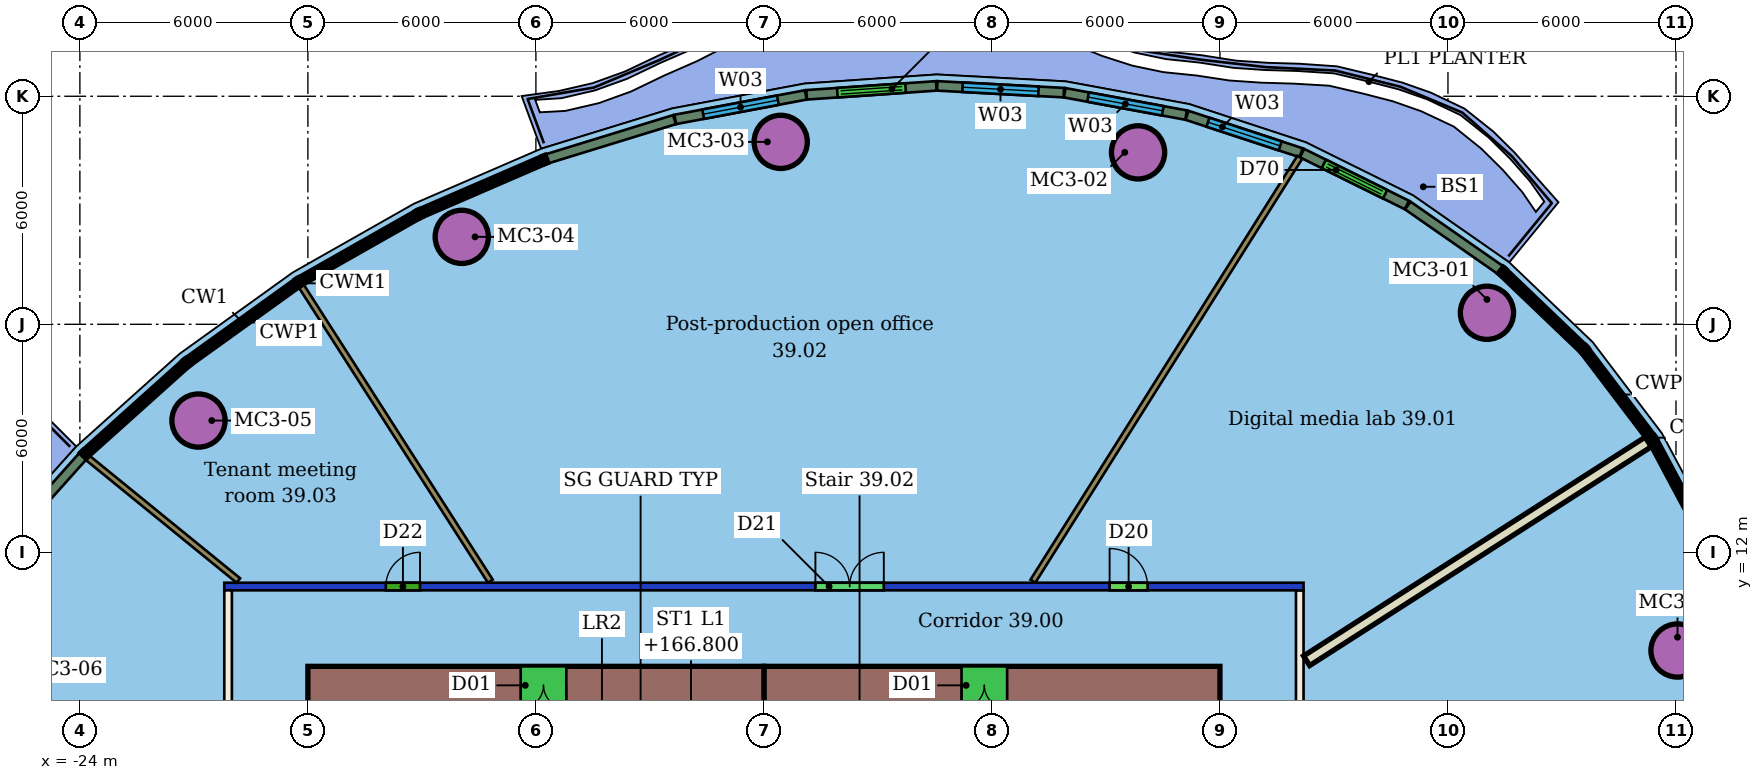
"""IFC4 building model, lengths in metres.
Left out: names, types, materials, properties, quantities, classifications, styles, units other than length and angle.
Written with IfcOpenShell. Run it as: python <this file> out.ifc"""

import sys

from ifc_helpers import new_model, si_unit, direction, frame, frame_2d, origin, origin_2d, place, context, subcontext, project, spatial, rectangle, hollow_circle, extrude, element, fill, save


model = new_model("IFC4")
c1 = context("Model", 3, precision=1e-05, world=origin(), true_north=direction((0.0, 1.0)))
c2 = subcontext(c1, "Body", "Model", "MODEL_VIEW")
j1 = project(units=[si_unit("LENGTHUNIT", "METRE"), si_unit("PLANEANGLEUNIT", "RADIAN")], contexts=[c1])
p1 = place(None, origin())
s1 = spatial("IfcSite", under=j1, at=p1, CompositionType="ELEMENT")
p2 = place(p1, origin())
s2 = spatial("IfcBuilding", under=s1, at=p2, CompositionType="ELEMENT")
p3 = place(p2, frame((0.0, 0.0, 165.0)))
s3 = spatial("IfcBuildingStorey", under=s2, at=p3, CompositionType="ELEMENT", Elevation=165.0)
for number, where, z_axis, x_axis in (
    (1, (13.026, 18.303, 0.0), (0.0, 0.0, 1.0), (1.0, 0.0, 0.0)),
    (2, (3.845, 22.524, 0.0), (0.0, 0.0, 1.0), (1.0, 0.0, 0.0)),
    (3, (-5.558, 22.8, 0.0), (0.0, 0.0, 1.0), (1.0, 0.0, 0.0)),
    (4, (-13.952, 20.301, 0.0), (0.0, 0.0, 1.0), (1.0, 0.0, 0.0)),
    (5, (-20.879, 15.467, 0.0), (0.0, 0.0, 1.0), (1.0, 0.0, 0.0)),
    (6, (18.041, 9.417, 0.0), (0.0, 0.0, 1.0), (1.0, 0.0, 0.0)),
):
    element("IfcColumn", number, at=place(p3, frame(where, z_axis=z_axis, x_axis=x_axis)), inside=s3, PredefinedType="COLUMN", context=c2, shape_type="SweptSolid", body=[
        extrude(hollow_circle(Radius=0.7, WallThickness=0.05, at=origin_2d()), origin(), (0.0, 0.0, 1.0), 3.45),
    ])
p4 = place(p3, frame((-20.1, -11.0, 0.0), z_axis=(0.0, 0.0, 1.0), x_axis=(0.0, 1.0, 0.0)))
e7 = element("IfcWall", 7, at=p4, inside=s3, PredefinedType="PARTITIONING", context=c2, shape_type="SweptSolid", body=[
    extrude(rectangle(XDim=22.0, YDim=0.2, at=frame_2d((11.0, 0.0))), origin(), (0.0, 0.0, 1.0), 3.45),
])
p5 = place(p4, frame((16.748, 0.0, 0.0)))
e8 = element("IfcOpeningElement", 8, at=p5, cuts=e7, PredefinedType="OPENING", context=c2, shape_type="SweptSolid", body=[
    extrude(rectangle(XDim=1.0, YDim=2.1, at=frame_2d((0.5, 1.05))), frame((0.0, 0.11, 0.0), z_axis=(0.0, -1.0, 0.0), x_axis=(1.0, 0.0, 0.0)), (0.0, 0.0, 1.0), 0.22),
])
p6 = place(p4, frame((11.959, 0.0, 0.0)))
e9 = element("IfcOpeningElement", 9, at=p6, cuts=e7, PredefinedType="OPENING", context=c2, shape_type="SweptSolid", body=[
    extrude(rectangle(XDim=1.1, YDim=2.1, at=frame_2d((0.55, 1.05))), frame((0.0, 0.11, 0.0), z_axis=(0.0, -1.0, 0.0), x_axis=(1.0, 0.0, 0.0)), (0.0, 0.0, 1.0), 0.22),
])
p7 = place(p4, frame((5.319, 0.0, 0.0)))
e10 = element("IfcOpeningElement", 10, at=p7, cuts=e7, PredefinedType="OPENING", context=c2, shape_type="SweptSolid", body=[
    extrude(rectangle(XDim=1.2, YDim=2.1, at=frame_2d((0.6, 1.05))), frame((0.0, 0.11, 0.0), z_axis=(0.0, -1.0, 0.0), x_axis=(1.0, 0.0, 0.0)), (0.0, 0.0, 1.0), 0.22),
])
p8 = place(p3, frame((-20.2, 11.1, 0.0), z_axis=(0.0, 0.0, 1.0), x_axis=(1.0, 0.0, 0.0)))
e11 = element("IfcWall", 11, at=p8, inside=s3, PredefinedType="PARTITIONING", context=c2, shape_type="SweptSolid", body=[
    extrude(rectangle(XDim=28.4, YDim=0.2, at=frame_2d((14.2, 0.0))), origin(), (0.0, 0.0, 1.0), 3.05),
])
p9 = place(p8, frame((23.297, 0.0, 0.0)))
e12 = element("IfcOpeningElement", 12, at=p9, cuts=e11, PredefinedType="OPENING", context=c2, shape_type="SweptSolid", body=[
    extrude(rectangle(XDim=1.0, YDim=2.1, at=frame_2d((0.5, 1.05))), frame((0.0, 0.11, 0.0), z_axis=(0.0, -1.0, 0.0), x_axis=(1.0, 0.0, 0.0)), (0.0, 0.0, 1.0), 0.22),
])
p10 = place(p8, frame((15.555, 0.0, 0.0)))
e13 = element("IfcOpeningElement", 13, at=p10, cuts=e11, PredefinedType="OPENING", context=c2, shape_type="SweptSolid", body=[
    extrude(rectangle(XDim=1.8, YDim=2.1, at=frame_2d((0.9, 1.05))), frame((0.0, 0.11, 0.0), z_axis=(0.0, -1.0, 0.0), x_axis=(1.0, 0.0, 0.0)), (0.0, 0.0, 1.0), 0.22),
])
p11 = place(p8, frame((4.251, 0.0, 0.0)))
e14 = element("IfcOpeningElement", 14, at=p11, cuts=e11, PredefinedType="OPENING", context=c2, shape_type="SweptSolid", body=[
    extrude(rectangle(XDim=0.9, YDim=2.1, at=frame_2d((0.45, 1.05))), frame((0.0, 0.11, 0.0), z_axis=(0.0, -1.0, 0.0), x_axis=(1.0, 0.0, 0.0)), (0.0, 0.0, 1.0), 0.22),
])
p12 = place(p3, frame((8.1, 11.0, 0.0), z_axis=(0.0, 0.0, 1.0), x_axis=(0.0, -1.0, 0.0)))
e15 = element("IfcWall", 15, at=p12, inside=s3, PredefinedType="PARTITIONING", context=c2, shape_type="SweptSolid", body=[
    extrude(rectangle(XDim=22.0, YDim=0.2, at=frame_2d((11.0, 0.0))), origin(), (0.0, 0.0, 1.0), 3.45),
])
p13 = place(p12, frame((12.895, 0.0, 0.0)))
e16 = element("IfcOpeningElement", 16, at=p13, cuts=e15, PredefinedType="OPENING", context=c2, shape_type="SweptSolid", body=[
    extrude(rectangle(XDim=1.2, YDim=2.1, at=frame_2d((0.6, 1.05))), frame((0.0, 0.11, 0.0), z_axis=(0.0, -1.0, 0.0), x_axis=(1.0, 0.0, 0.0)), (0.0, 0.0, 1.0), 0.22),
])
p14 = place(p12, frame((5.997, 0.0, 0.0)))
e17 = element("IfcOpeningElement", 17, at=p14, cuts=e15, PredefinedType="OPENING", context=c2, shape_type="SweptSolid", body=[
    extrude(rectangle(XDim=1.1, YDim=2.1, at=frame_2d((0.55, 1.05))), frame((0.0, 0.11, 0.0), z_axis=(0.0, -1.0, 0.0), x_axis=(1.0, 0.0, 0.0)), (0.0, 0.0, 1.0), 0.22),
])
p15 = place(p3, frame((17.27, 14.905, 0.0), z_axis=(0.0, 0.0, 1.0), x_axis=(-0.842071977219, -0.539365168678, 0.0)))
e18 = element("IfcWall", 18, at=p15, inside=s3, PredefinedType="PARTITIONING", context=c2, shape_type="SweptSolid", body=[
    extrude(rectangle(XDim=10.675, YDim=0.3, at=frame_2d((5.337, 0.0))), origin(), (0.0, 0.0, 1.0), 3.45),
])
p16 = place(p3, frame((8.101, 22.394, 0.0), z_axis=(0.0, 0.0, 1.0), x_axis=(-0.532862885492, -0.846201598477, 0.0)))
e19 = element("IfcWall", 19, at=p16, inside=s3, PredefinedType="PARTITIONING", context=c2, shape_type="SweptSolid", body=[
    extrude(rectangle(XDim=13.181, YDim=0.15, at=frame_2d((6.59, 0.0))), origin(), (0.0, 0.0, 1.0), 3.45),
])
p17 = place(p3, frame((-18.172, 19.004, 0.0), z_axis=(0.0, 0.0, 1.0), x_axis=(0.539366262067, -0.842071276879, 0.0)))
e20 = element("IfcWall", 20, at=p17, inside=s3, PredefinedType="PARTITIONING", context=c2, shape_type="SweptSolid", body=[
    extrude(rectangle(XDim=9.219, YDim=0.15, at=frame_2d((4.61, 0.0))), origin(), (0.0, 0.0, 1.0), 3.45),
])
p18 = place(p3, frame((-23.794, 14.485, 0.0), z_axis=(0.0, 0.0, 1.0), x_axis=(0.775504350121, -0.631342223317, 0.0)))
e21 = element("IfcWall", 21, at=p18, inside=s3, PredefinedType="PARTITIONING", context=c2, shape_type="SweptSolid", body=[
    extrude(rectangle(XDim=5.111, YDim=0.15, at=frame_2d((2.556, 0.0))), origin(), (0.0, 0.0, 1.0), 3.45),
])
p19 = place(p3, frame((13.378, 19.429, 0.0), z_axis=(0.0, 0.0, 1.0), x_axis=(-0.820566469183, 0.571551108521, 0.0)))
e22 = element("IfcWall", 22, at=p19, inside=s3, PredefinedType="SOLIDWALL", context=c2, shape_type="SweptSolid", body=[
    extrude(rectangle(XDim=2.969, YDim=0.25, at=frame_2d((1.484, 0.0))), origin(), (0.0, 0.0, 1.0), 3.1),
])
p20 = place(p3, frame((10.919, 21.139, 0.0), z_axis=(0.0, 0.0, 1.0), x_axis=(-0.896353964816, 0.443339113725, 0.0)))
e23 = element("IfcWall", 23, at=p20, inside=s3, PredefinedType="SOLIDWALL", context=c2, shape_type="SweptSolid", body=[
    extrude(rectangle(XDim=3.078, YDim=0.25, at=frame_2d((1.539, 0.0))), origin(), (0.0, 0.0, 1.0), 3.1),
])
p21 = place(p20, frame((0.639, 0.0, 0.0)))
e24 = element("IfcOpeningElement", 24, at=p21, cuts=e23, PredefinedType="OPENING", context=c2, shape_type="SweptSolid", body=[
    extrude(rectangle(XDim=1.8, YDim=2.4, at=frame_2d((0.9, 1.2))), frame((0.0, 0.135, 0.0), z_axis=(0.0, -1.0, 0.0), x_axis=(1.0, 0.0, 0.0)), (0.0, 0.0, 1.0), 0.27),
])
p22 = place(p3, frame((8.136, 22.514, 0.0), z_axis=(0.0, 0.0, 1.0), x_axis=(-0.950163900918, 0.311750800147, 0.0)))
e25 = element("IfcWall", 25, at=p22, inside=s3, PredefinedType="SOLIDWALL", context=c2, shape_type="SweptSolid", body=[
    extrude(rectangle(XDim=3.16, YDim=0.25, at=frame_2d((1.58, 0.0))), origin(), (0.0, 0.0, 1.0), 3.1),
])
p23 = place(p22, frame((0.58, 0.0, 0.9)))
e26 = element("IfcOpeningElement", 26, at=p23, cuts=e25, PredefinedType="OPENING", context=c2, shape_type="SweptSolid", body=[
    extrude(rectangle(XDim=2.0, YDim=2.1, at=frame_2d((1.0, 1.05))), frame((0.0, 0.135, 0.0), z_axis=(0.0, -1.0, 0.0), x_axis=(1.0, 0.0, 0.0)), (0.0, 0.0, 1.0), 0.27),
])
p24 = place(p3, frame((5.11, 23.505, 0.0), z_axis=(0.0, 0.0, 1.0), x_axis=(-0.983511988616, 0.180842938067, 0.0)))
e27 = element("IfcWall", 27, at=p24, inside=s3, PredefinedType="SOLIDWALL", context=c2, shape_type="SweptSolid", body=[
    extrude(rectangle(XDim=3.248, YDim=0.25, at=frame_2d((1.624, 0.0))), origin(), (0.0, 0.0, 1.0), 3.1),
])
p25 = place(p24, frame((0.624, 0.0, 0.9)))
e28 = element("IfcOpeningElement", 28, at=p25, cuts=e27, PredefinedType="OPENING", context=c2, shape_type="SweptSolid", body=[
    extrude(rectangle(XDim=2.0, YDim=2.1, at=frame_2d((1.0, 1.05))), frame((0.0, 0.135, 0.0), z_axis=(0.0, -1.0, 0.0), x_axis=(1.0, 0.0, 0.0)), (0.0, 0.0, 1.0), 0.27),
])
p26 = place(p3, frame((1.891, 24.095, 0.0), z_axis=(0.0, 0.0, 1.0), x_axis=(-0.998572595535, 0.053411341936, 0.0)))
e29 = element("IfcWall", 29, at=p26, inside=s3, PredefinedType="SOLIDWALL", context=c2, shape_type="SweptSolid", body=[
    extrude(rectangle(XDim=3.337, YDim=0.25, at=frame_2d((1.668, 0.0))), origin(), (0.0, 0.0, 1.0), 3.1),
])
p27 = place(p26, frame((0.668, 0.0, 0.9)))
e30 = element("IfcOpeningElement", 30, at=p27, cuts=e29, PredefinedType="OPENING", context=c2, shape_type="SweptSolid", body=[
    extrude(rectangle(XDim=2.0, YDim=2.1, at=frame_2d((1.0, 1.05))), frame((0.0, 0.135, 0.0), z_axis=(0.0, -1.0, 0.0), x_axis=(1.0, 0.0, 0.0)), (0.0, 0.0, 1.0), 0.27),
])
p28 = place(p3, frame((-1.464, 24.273, 0.0), z_axis=(0.0, 0.0, 1.0), x_axis=(-0.997639779644, -0.068664911499, 0.0)))
e31 = element("IfcWall", 31, at=p28, inside=s3, PredefinedType="SOLIDWALL", context=c2, shape_type="SweptSolid", body=[
    extrude(rectangle(XDim=3.42, YDim=0.25, at=frame_2d((1.71, 0.0))), origin(), (0.0, 0.0, 1.0), 3.1),
])
p29 = place(p28, frame((0.81, 0.0, 0.0)))
e32 = element("IfcOpeningElement", 32, at=p29, cuts=e31, PredefinedType="OPENING", context=c2, shape_type="SweptSolid", body=[
    extrude(rectangle(XDim=1.8, YDim=2.4, at=frame_2d((0.9, 1.2))), frame((0.0, 0.135, 0.0), z_axis=(0.0, -1.0, 0.0), x_axis=(1.0, 0.0, 0.0)), (0.0, 0.0, 1.0), 0.27),
])
p30 = place(p3, frame((-4.899, 24.035, 0.0), z_axis=(0.0, 0.0, 1.0), x_axis=(-0.982808840364, -0.184626063442, 0.0)))
e33 = element("IfcWall", 33, at=p30, inside=s3, PredefinedType="SOLIDWALL", context=c2, shape_type="SweptSolid", body=[
    extrude(rectangle(XDim=3.494, YDim=0.25, at=frame_2d((1.747, 0.0))), origin(), (0.0, 0.0, 1.0), 3.1),
])
p31 = place(p30, frame((0.747, 0.0, 0.9)))
e34 = element("IfcOpeningElement", 34, at=p31, cuts=e33, PredefinedType="OPENING", context=c2, shape_type="SweptSolid", body=[
    extrude(rectangle(XDim=2.0, YDim=2.1, at=frame_2d((1.0, 1.05))), frame((0.0, 0.135, 0.0), z_axis=(0.0, -1.0, 0.0), x_axis=(1.0, 0.0, 0.0)), (0.0, 0.0, 1.0), 0.27),
])
p32 = place(p3, frame((-8.354, 23.385, 0.0), z_axis=(0.0, 0.0, 1.0), x_axis=(-0.955795559149, -0.294032054565, 0.0)))
e35 = element("IfcWall", 35, at=p32, inside=s3, PredefinedType="SOLIDWALL", context=c2, shape_type="SweptSolid", body=[
    extrude(rectangle(XDim=3.508, YDim=0.25, at=frame_2d((1.754, 0.0))), origin(), (0.0, 0.0, 1.0), 3.1),
])
p33 = place(p3, frame((-23.919, 14.532, 0.0), z_axis=(0.0, 0.0, 1.0), x_axis=(-0.666731798782, -0.745297731443, 0.0)))
e36 = element("IfcWall", 36, at=p33, inside=s3, PredefinedType="SOLIDWALL", context=c2, shape_type="SweptSolid", body=[
    extrude(rectangle(XDim=3.508, YDim=0.25, at=frame_2d((1.754, 0.0))), origin(), (0.0, 0.0, 1.0), 3.1),
])
p34 = place(p3, frame((6.0, 8.5, 0.0), z_axis=(0.0, 0.0, 1.0), x_axis=(-1.0, 0.0, 0.0)))
e37 = element("IfcWall", 37, at=p34, inside=s3, PredefinedType="SHEAR", context=c2, shape_type="SweptSolid", body=[
    extrude(rectangle(XDim=12.0, YDim=1.0, at=frame_2d((6.0, 0.0))), origin(), (0.0, 0.0, 1.0), 3.3),
])
p35 = place(p34, frame((5.6, 0.0, 0.0)))
e38 = element("IfcOpeningElement", 38, at=p35, cuts=e37, PredefinedType="OPENING", context=c2, shape_type="SweptSolid", body=[
    extrude(rectangle(XDim=1.2, YDim=2.1, at=frame_2d((0.6, 1.05))), frame((0.0, 0.51, 0.0), z_axis=(0.0, -1.0, 0.0), x_axis=(1.0, 0.0, 0.0)), (0.0, 0.0, 1.0), 1.02),
])
p36 = place(p3, frame((-6.0, 8.5, 0.0), z_axis=(0.0, 0.0, 1.0), x_axis=(-1.0, 0.0, 0.0)))
e39 = element("IfcWall", 39, at=p36, inside=s3, PredefinedType="SHEAR", context=c2, shape_type="SweptSolid", body=[
    extrude(rectangle(XDim=12.0, YDim=1.0, at=frame_2d((6.0, 0.0))), origin(), (0.0, 0.0, 1.0), 3.3),
])
p37 = place(p36, frame((5.2, 0.0, 0.0)))
e40 = element("IfcOpeningElement", 40, at=p37, cuts=e39, PredefinedType="OPENING", context=c2, shape_type="SweptSolid", body=[
    extrude(rectangle(XDim=1.2, YDim=2.1, at=frame_2d((0.6, 1.05))), frame((0.0, 0.51, 0.0), z_axis=(0.0, -1.0, 0.0), x_axis=(1.0, 0.0, 0.0)), (0.0, 0.0, 1.0), 1.02),
])
p38 = place(p9, origin())
e41 = element("IfcDoor", 41, at=p38, inside=s3, OperationType="SINGLE_SWING_LEFT", PredefinedType="DOOR", context=c2, shape_type="SweptSolid", body=[
    extrude(rectangle(XDim=1.0, YDim=2.1, at=frame_2d((0.5, 1.05))), frame((0.0, 0.025, 0.0), z_axis=(0.0, -1.0, 0.0), x_axis=(1.0, 0.0, 0.0)), (0.0, 0.0, 1.0), 0.05),
])
fill(e12, e41)
p39 = place(p10, origin())
e42 = element("IfcDoor", 42, at=p39, inside=s3, OperationType="DOUBLE_DOOR_SINGLE_SWING", PredefinedType="DOOR", context=c2, shape_type="SweptSolid", body=[
    extrude(rectangle(XDim=1.8, YDim=2.1, at=frame_2d((0.9, 1.05))), frame((0.0, 0.025, 0.0), z_axis=(0.0, -1.0, 0.0), x_axis=(1.0, 0.0, 0.0)), (0.0, 0.0, 1.0), 0.05),
])
fill(e13, e42)
p40 = place(p11, origin())
e43 = element("IfcDoor", 43, at=p40, inside=s3, OperationType="SINGLE_SWING_RIGHT", PredefinedType="DOOR", context=c2, shape_type="SweptSolid", body=[
    extrude(rectangle(XDim=0.9, YDim=2.1, at=frame_2d((0.45, 1.05))), frame((0.0, 0.025, 0.0), z_axis=(0.0, -1.0, 0.0), x_axis=(1.0, 0.0, 0.0)), (0.0, 0.0, 1.0), 0.05),
])
fill(e14, e43)
p41 = place(p21, origin())
e44 = element("IfcDoor", 44, at=p41, inside=s3, OperationType="DOUBLE_DOOR_SLIDING", PredefinedType="DOOR", context=c2, shape_type="SweptSolid", body=[
    extrude(rectangle(XDim=1.8, YDim=2.4, at=frame_2d((0.9, 1.2))), frame((0.0, 0.025, 0.0), z_axis=(0.0, -1.0, 0.0), x_axis=(1.0, 0.0, 0.0)), (0.0, 0.0, 1.0), 0.05),
])
fill(e24, e44)
p42 = place(p23, origin())
e45 = element("IfcWindow", 45, at=p42, inside=s3, PartitioningType="SINGLE_PANEL", PredefinedType="WINDOW", context=c2, shape_type="SweptSolid", body=[
    extrude(rectangle(XDim=2.0, YDim=2.1, at=frame_2d((1.0, 1.05))), frame((0.0, 0.03, 0.0), z_axis=(0.0, -1.0, 0.0), x_axis=(1.0, 0.0, 0.0)), (0.0, 0.0, 1.0), 0.06),
])
fill(e26, e45)
p43 = place(p25, origin())
e46 = element("IfcWindow", 46, at=p43, inside=s3, PartitioningType="SINGLE_PANEL", PredefinedType="WINDOW", context=c2, shape_type="SweptSolid", body=[
    extrude(rectangle(XDim=2.0, YDim=2.1, at=frame_2d((1.0, 1.05))), frame((0.0, 0.03, 0.0), z_axis=(0.0, -1.0, 0.0), x_axis=(1.0, 0.0, 0.0)), (0.0, 0.0, 1.0), 0.06),
])
fill(e28, e46)
p44 = place(p27, origin())
e47 = element("IfcWindow", 47, at=p44, inside=s3, PartitioningType="SINGLE_PANEL", PredefinedType="WINDOW", context=c2, shape_type="SweptSolid", body=[
    extrude(rectangle(XDim=2.0, YDim=2.1, at=frame_2d((1.0, 1.05))), frame((0.0, 0.03, 0.0), z_axis=(0.0, -1.0, 0.0), x_axis=(1.0, 0.0, 0.0)), (0.0, 0.0, 1.0), 0.06),
])
fill(e30, e47)
p45 = place(p29, origin())
e48 = element("IfcDoor", 48, at=p45, inside=s3, OperationType="DOUBLE_DOOR_SLIDING", PredefinedType="DOOR", context=c2, shape_type="SweptSolid", body=[
    extrude(rectangle(XDim=1.8, YDim=2.4, at=frame_2d((0.9, 1.2))), frame((0.0, 0.025, 0.0), z_axis=(0.0, -1.0, 0.0), x_axis=(1.0, 0.0, 0.0)), (0.0, 0.0, 1.0), 0.05),
])
fill(e32, e48)
p46 = place(p31, origin())
e49 = element("IfcWindow", 49, at=p46, inside=s3, PartitioningType="SINGLE_PANEL", PredefinedType="WINDOW", context=c2, shape_type="SweptSolid", body=[
    extrude(rectangle(XDim=2.0, YDim=2.1, at=frame_2d((1.0, 1.05))), frame((0.0, 0.03, 0.0), z_axis=(0.0, -1.0, 0.0), x_axis=(1.0, 0.0, 0.0)), (0.0, 0.0, 1.0), 0.06),
])
fill(e34, e49)
p47 = place(p35, origin())
e50 = element("IfcDoor", 50, at=p47, inside=s3, OperationType="DOUBLE_DOOR_SINGLE_SWING", PredefinedType="NOTDEFINED", context=c2, shape_type="SweptSolid", body=[
    extrude(rectangle(XDim=1.2, YDim=2.1, at=frame_2d((0.6, 1.05))), frame((0.0, 0.025, 0.0), z_axis=(0.0, -1.0, 0.0), x_axis=(1.0, 0.0, 0.0)), (0.0, 0.0, 1.0), 0.05),
])
fill(e38, e50)
p48 = place(p37, origin())
e51 = element("IfcDoor", 51, at=p48, inside=s3, OperationType="DOUBLE_DOOR_SINGLE_SWING", PredefinedType="NOTDEFINED", context=c2, shape_type="SweptSolid", body=[
    extrude(rectangle(XDim=1.2, YDim=2.1, at=frame_2d((0.6, 1.05))), frame((0.0, 0.025, 0.0), z_axis=(0.0, -1.0, 0.0), x_axis=(1.0, 0.0, 0.0)), (0.0, 0.0, 1.0), 0.05),
])
fill(e40, e51)
save(model, sys.argv[1])
